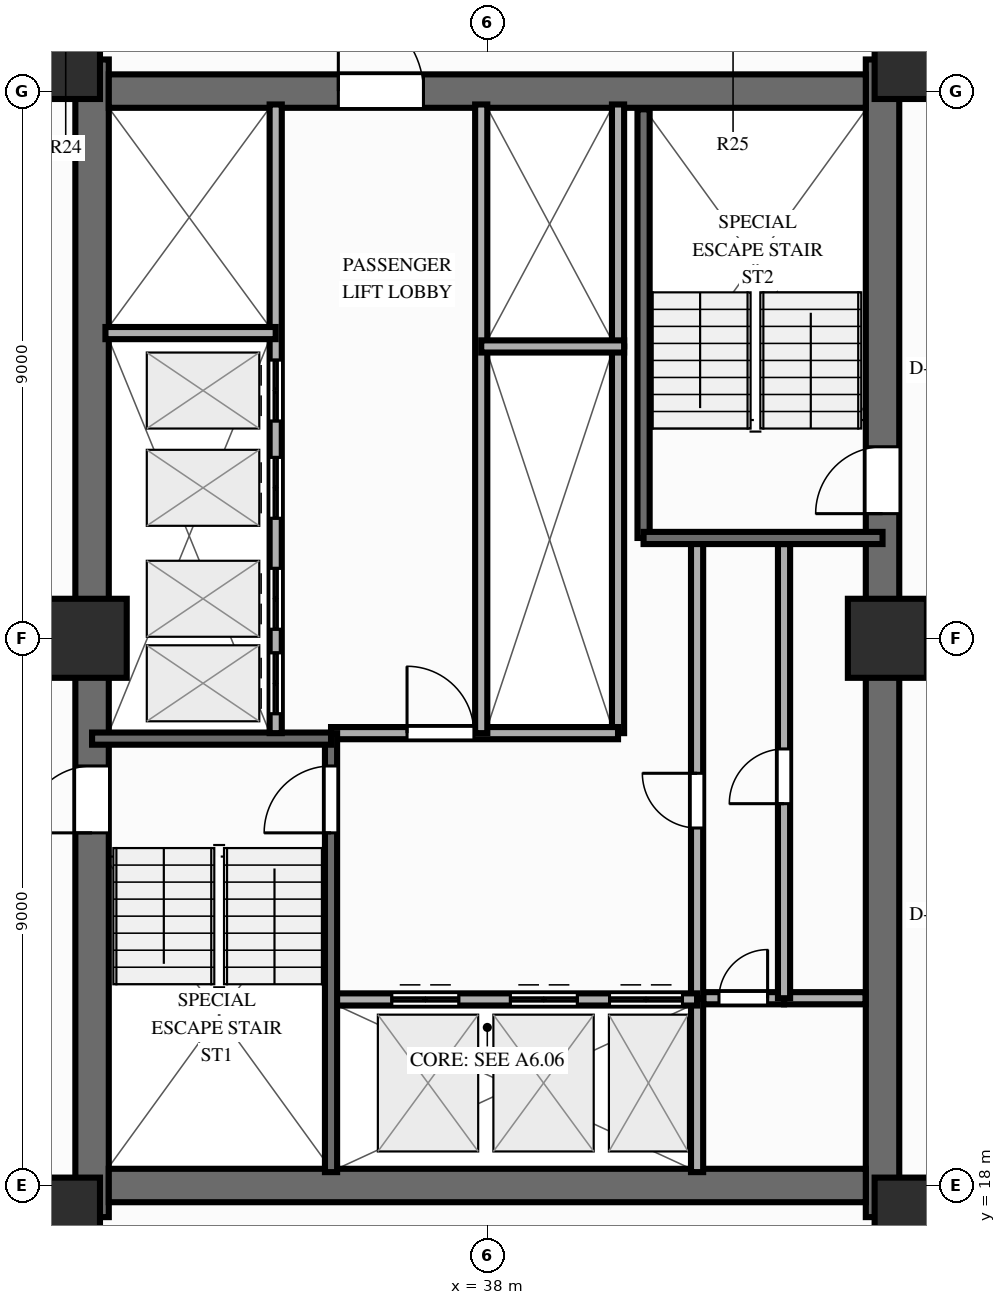
"""IFC4 building model, lengths in metres.
Left out: names, types, materials, properties, quantities, classifications, styles, units other than length and angle.
Written with IfcOpenShell. Run it as: python <this file> out.ifc"""

import sys

from ifc_helpers import new_model, si_unit, direction, frame, frame_2d, origin, origin_2d, place, context, subcontext, project, spatial, rectangle, extrude, source, transform, mapped, element, fill, save


model = new_model("IFC4")
c1 = context("Model", 3, precision=1e-05, world=origin(), true_north=direction((0.0, 1.0)))
c2 = subcontext(c1, "Body", "Model", "MODEL_VIEW")
j1 = project(units=[si_unit("LENGTHUNIT", "METRE"), si_unit("PLANEANGLEUNIT", "RADIAN")], contexts=[c1])
p1 = place(None, origin())
s1 = spatial("IfcSite", under=j1, at=p1, CompositionType="ELEMENT")
p2 = place(p1, origin())
s2 = spatial("IfcBuilding", under=s1, at=p2, CompositionType="ELEMENT")
p3 = place(p2, frame((0.0, 0.0, 86.85)))
s3 = spatial("IfcBuildingStorey", under=s2, at=p3, CompositionType="ELEMENT", Elevation=86.85)
p4 = place(p3, frame((31.5, 17.48, 0.0), z_axis=(0.0, 0.0, 1.0), x_axis=(0.0, 1.0, 0.0)))
e1 = element("IfcWall", 1, at=p4, inside=s3, PredefinedType="SHEAR", context=c2, shape_type="SweptSolid", body=[
    extrude(rectangle(XDim=19.04, YDim=0.55, at=frame_2d((9.52, 0.0))), origin(), (0.0, 0.0, 1.0), 3.0),
])
p5 = place(p4, frame((6.32, 0.0, 0.0)))
e2 = element("IfcOpeningElement", 2, at=p5, cuts=e1, PredefinedType="OPENING", context=c2, shape_type="SweptSolid", body=[
    extrude(rectangle(XDim=1.1, YDim=2.15, at=frame_2d((0.55, 1.075))), frame((0.0, 0.287, 0.0), z_axis=(0.0, -1.0, 0.0), x_axis=(1.0, 0.0, 0.0)), (0.0, 0.0, 1.0), 0.574),
])
p6 = place(p3, frame((44.5, 17.48, 0.0), z_axis=(0.0, 0.0, 1.0), x_axis=(0.0, 1.0, 0.0)))
e3 = element("IfcWall", 3, at=p6, inside=s3, PredefinedType="SHEAR", context=c2, shape_type="SweptSolid", body=[
    extrude(rectangle(XDim=19.04, YDim=0.55, at=frame_2d((9.52, 0.0))), origin(), (0.0, 0.0, 1.0), 3.0),
])
p7 = place(p6, frame((12.67, 0.0, 0.0), z_axis=(0.0, 0.0, 1.0), x_axis=(-1.0, 0.0, 0.0)))
e4 = element("IfcOpeningElement", 4, at=p7, cuts=e3, PredefinedType="OPENING", context=c2, shape_type="SweptSolid", body=[
    extrude(rectangle(XDim=1.1, YDim=2.15, at=frame_2d((0.55, 1.075))), frame((0.0, 0.287, 0.0), z_axis=(0.0, -1.0, 0.0), x_axis=(1.0, 0.0, 0.0)), (0.0, 0.0, 1.0), 0.574),
])
p8 = place(p3, frame((31.775, 18.0, 0.0), z_axis=(0.0, 0.0, 1.0), x_axis=(1.0, 0.0, 0.0)))
e5 = element("IfcWall", 5, at=p8, inside=s3, PredefinedType="SHEAR", context=c2, shape_type="SweptSolid", body=[
    extrude(rectangle(XDim=12.45, YDim=0.55, at=frame_2d((6.225, 0.0))), origin(), (0.0, 0.0, 1.0), 3.0),
])
p9 = place(p3, frame((31.775, 36.0, 0.0), z_axis=(0.0, 0.0, 1.0), x_axis=(1.0, 0.0, 0.0)))
e6 = element("IfcWall", 6, at=p9, inside=s3, PredefinedType="SHEAR", context=c2, shape_type="SweptSolid", body=[
    extrude(rectangle(XDim=12.45, YDim=0.55, at=frame_2d((6.225, 0.0))), origin(), (0.0, 0.0, 1.0), 3.0),
])
p10 = place(p9, frame((5.175, 0.0, 0.0), z_axis=(0.0, 0.0, 1.0), x_axis=(-1.0, 0.0, 0.0)))
e7 = element("IfcOpeningElement", 7, at=p10, cuts=e6, PredefinedType="OPENING", context=c2, shape_type="SweptSolid", body=[
    extrude(rectangle(XDim=1.4, YDim=2.15, at=frame_2d((0.7, 1.075))), frame((0.0, 0.287, 0.0), z_axis=(0.0, -1.0, 0.0), x_axis=(1.0, 0.0, 0.0)), (0.0, 0.0, 1.0), 0.574),
])
m1 = source(origin(), c2, "Body", "SweptSolid", [
    extrude(rectangle(XDim=1.3, YDim=1.3, at=origin_2d()), origin(), (0.0, 0.0, 1.0), 3.0),
])
for number, where, z_axis, x_axis in (
    (8, (30.98, 17.48, 0.0), (0.0, 0.0, 1.0), (1.0, 0.0, 0.0)),
    (9, (45.02, 17.48, 0.0), (0.0, 0.0, 1.0), (1.0, 0.0, 0.0)),
    (10, (30.98, 36.52, 0.0), (0.0, 0.0, 1.0), (1.0, 0.0, 0.0)),
    (11, (45.02, 36.52, 0.0), (0.0, 0.0, 1.0), (1.0, 0.0, 0.0)),
    (12, (31.42, 27.0, 0.0), (0.0, 0.0, 1.0), (1.0, 0.0, 0.0)),
    (13, (44.58, 27.0, 0.0), (0.0, 0.0, 1.0), (1.0, 0.0, 0.0)),
):
    element("IfcColumn", number, at=place(p3, frame(where, z_axis=z_axis, x_axis=x_axis)), inside=s3, PredefinedType="COLUMN", context=c2, shape_type="MappedRepresentation", body=[
        mapped(m1, transform((0.0, 0.0, 0.0), scale=1.0)),
    ])
p11 = place(p3, frame((41.55, 21.08, 0.0), z_axis=(0.0, 0.0, 1.0), x_axis=(1.0, 0.0, 0.0)))
e14 = element("IfcWall", 14, at=p11, inside=s3, PredefinedType="PARTITIONING", context=c2, shape_type="SweptSolid", body=[
    extrude(rectangle(XDim=1.33, YDim=0.2, at=frame_2d((0.665, 0.0))), origin(), (0.0, 0.0, 1.0), 2.79),
])
p12 = place(p11, frame((0.26, 0.0, 0.0)))
e15 = element("IfcOpeningElement", 15, at=p12, cuts=e14, PredefinedType="OPENING", context=c2, shape_type="SweptSolid", body=[
    extrude(rectangle(XDim=0.8, YDim=2.05, at=frame_2d((0.4, 1.025))), frame((0.0, 0.112, 0.0), z_axis=(0.0, -1.0, 0.0), x_axis=(1.0, 0.0, 0.0)), (0.0, 0.0, 1.0), 0.224),
])
p13 = place(p3, frame((42.88, 21.08, 0.0), z_axis=(0.0, 0.0, 1.0), x_axis=(1.0, 0.0, 0.0)))
e16 = element("IfcWall", 16, at=p13, inside=s3, PredefinedType="PARTITIONING", context=c2, shape_type="SweptSolid", body=[
    extrude(rectangle(XDim=1.34, YDim=0.2, at=frame_2d((0.67, 0.0))), origin(), (0.0, 0.0, 1.0), 2.79),
])
p14 = place(p3, frame((42.88, 21.08, 0.0), z_axis=(0.0, 0.0, 1.0), x_axis=(0.0, 1.0, 0.0)))
e17 = element("IfcWall", 17, at=p14, inside=s3, PredefinedType="PARTITIONING", context=c2, shape_type="SweptSolid", body=[
    extrude(rectangle(XDim=7.47, YDim=0.2, at=frame_2d((3.735, 0.0))), origin(), (0.0, 0.0, 1.0), 2.79),
])
p15 = place(p14, frame((3.2, 0.0, 0.0)))
e18 = element("IfcOpeningElement", 18, at=p15, cuts=e17, PredefinedType="OPENING", context=c2, shape_type="SweptSolid", body=[
    extrude(rectangle(XDim=0.9, YDim=2.1, at=frame_2d((0.45, 1.05))), frame((0.0, 0.112, 0.0), z_axis=(0.0, -1.0, 0.0), x_axis=(1.0, 0.0, 0.0)), (0.0, 0.0, 1.0), 0.224),
])
p16 = place(p3, frame((41.45, 18.22, 0.0), z_axis=(0.0, 0.0, 1.0), x_axis=(0.0, 1.0, 0.0)))
e19 = element("IfcWall", 19, at=p16, inside=s3, PredefinedType="PARTITIONING", context=c2, shape_type="SweptSolid", body=[
    extrude(rectangle(XDim=2.86, YDim=0.2, at=frame_2d((1.43, 0.0))), origin(), (0.0, 0.0, 1.0), 2.79),
])
p17 = place(p3, frame((41.45, 21.08, 0.0), z_axis=(0.0, 0.0, 1.0), x_axis=(0.0, 1.0, 0.0)))
e20 = element("IfcWall", 20, at=p17, inside=s3, PredefinedType="PARTITIONING", context=c2, shape_type="SweptSolid", body=[
    extrude(rectangle(XDim=7.52, YDim=0.2, at=frame_2d((3.76, 0.0))), origin(), (0.0, 0.0, 1.0), 2.79),
])
p18 = place(p17, frame((2.8, 0.0, 0.0)))
e21 = element("IfcOpeningElement", 21, at=p18, cuts=e20, PredefinedType="OPENING", context=c2, shape_type="SweptSolid", body=[
    extrude(rectangle(XDim=0.9, YDim=2.1, at=frame_2d((0.45, 1.05))), frame((0.0, 0.112, 0.0), z_axis=(0.0, -1.0, 0.0), x_axis=(1.0, 0.0, 0.0)), (0.0, 0.0, 1.0), 0.224),
])
p19 = place(p3, frame((40.15, 25.44, 0.0), z_axis=(0.0, 0.0, 1.0), x_axis=(0.0, 1.0, 0.0)))
e22 = element("IfcWall", 22, at=p19, inside=s3, PredefinedType="PARTITIONING", context=c2, shape_type="SweptSolid", body=[
    extrude(rectangle(XDim=6.36, YDim=0.2, at=frame_2d((3.18, 0.0))), origin(), (0.0, 0.0, 1.0), 2.79),
])
p20 = place(p3, frame((40.15, 31.8, 0.0), z_axis=(0.0, 0.0, 1.0), x_axis=(0.0, 1.0, 0.0)))
e23 = element("IfcWall", 23, at=p20, inside=s3, PredefinedType="PARTITIONING", context=c2, shape_type="SweptSolid", body=[
    extrude(rectangle(XDim=3.98, YDim=0.2, at=frame_2d((1.99, 0.0))), origin(), (0.0, 0.0, 1.0), 2.79),
])
p21 = place(p3, frame((35.43, 21.06, 0.0), z_axis=(0.0, 0.0, 1.0), x_axis=(1.0, 0.0, 0.0)))
e24 = element("IfcWall", 24, at=p21, inside=s3, PredefinedType="PARTITIONING", context=c2, shape_type="SweptSolid", body=[
    extrude(rectangle(XDim=6.02, YDim=0.2, at=frame_2d((3.01, 0.0))), origin(), (0.0, 0.0, 1.0), 2.79),
])
p22 = place(p21, frame((1.0, 0.0, 0.0)))
e25 = element("IfcOpeningElement", 25, at=p22, cuts=e24, PredefinedType="OPENING", context=c2, shape_type="SweptSolid", body=[
    extrude(rectangle(XDim=1.1, YDim=2.15, at=frame_2d((0.55, 1.075))), frame((0.0, 0.112, 0.0), z_axis=(0.0, -1.0, 0.0), x_axis=(1.0, 0.0, 0.0)), (0.0, 0.0, 1.0), 0.224),
])
p23 = place(p21, frame((2.95, 0.0, 0.0)))
e26 = element("IfcOpeningElement", 26, at=p23, cuts=e24, PredefinedType="OPENING", context=c2, shape_type="SweptSolid", body=[
    extrude(rectangle(XDim=1.1, YDim=2.15, at=frame_2d((0.55, 1.075))), frame((0.0, 0.112, 0.0), z_axis=(0.0, -1.0, 0.0), x_axis=(1.0, 0.0, 0.0)), (0.0, 0.0, 1.0), 0.224),
])
p24 = place(p21, frame((4.58, 0.0, 0.0)))
e27 = element("IfcOpeningElement", 27, at=p24, cuts=e24, PredefinedType="OPENING", context=c2, shape_type="SweptSolid", body=[
    extrude(rectangle(XDim=1.2, YDim=2.15, at=frame_2d((0.6, 1.075))), frame((0.0, 0.112, 0.0), z_axis=(0.0, -1.0, 0.0), x_axis=(1.0, 0.0, 0.0)), (0.0, 0.0, 1.0), 0.224),
])
p25 = place(p3, frame((35.43, 25.44, 0.0), z_axis=(0.0, 0.0, 1.0), x_axis=(1.0, 0.0, 0.0)))
e28 = element("IfcWall", 28, at=p25, inside=s3, PredefinedType="PARTITIONING", context=c2, shape_type="SweptSolid", body=[
    extrude(rectangle(XDim=4.72, YDim=0.2, at=frame_2d((2.36, 0.0))), origin(), (0.0, 0.0, 1.0), 2.79),
])
p26 = place(p25, frame((1.25, 0.0, 0.0)))
e29 = element("IfcOpeningElement", 29, at=p26, cuts=e28, PredefinedType="OPENING", context=c2, shape_type="SweptSolid", body=[
    extrude(rectangle(XDim=1.1, YDim=2.15, at=frame_2d((0.55, 1.075))), frame((0.0, 0.112, 0.0), z_axis=(0.0, -1.0, 0.0), x_axis=(1.0, 0.0, 0.0)), (0.0, 0.0, 1.0), 0.224),
])
p27 = place(p3, frame((35.43, 18.22, 0.0), z_axis=(0.0, 0.0, 1.0), x_axis=(0.0, 1.0, 0.0)))
e30 = element("IfcWall", 30, at=p27, inside=s3, PredefinedType="SOLIDWALL", context=c2, shape_type="SweptSolid", body=[
    extrude(rectangle(XDim=7.22, YDim=0.2, at=frame_2d((3.61, 0.0))), origin(), (0.0, 0.0, 1.0), 2.79),
])
p28 = place(p27, frame((6.68, 0.0, 0.0), z_axis=(0.0, 0.0, 1.0), x_axis=(-1.0, 0.0, 0.0)))
e31 = element("IfcOpeningElement", 31, at=p28, cuts=e30, PredefinedType="OPENING", context=c2, shape_type="SweptSolid", body=[
    extrude(rectangle(XDim=1.1, YDim=2.15, at=frame_2d((0.55, 1.075))), frame((0.0, 0.112, 0.0), z_axis=(0.0, -1.0, 0.0), x_axis=(1.0, 0.0, 0.0)), (0.0, 0.0, 1.0), 0.224),
])
p29 = place(p3, frame((31.5, 25.35, 0.0), z_axis=(0.0, 0.0, 1.0), x_axis=(1.0, 0.0, 0.0)))
e32 = element("IfcWall", 32, at=p29, inside=s3, PredefinedType="SOLIDWALL", context=c2, shape_type="SweptSolid", body=[
    extrude(rectangle(XDim=3.93, YDim=0.2, at=frame_2d((1.965, 0.0))), origin(), (0.0, 0.0, 1.0), 2.79),
])
p30 = place(p3, frame((40.57, 28.65, 0.0), z_axis=(0.0, 0.0, 1.0), x_axis=(0.0, 1.0, 0.0)))
e33 = element("IfcWall", 33, at=p30, inside=s3, PredefinedType="SOLIDWALL", context=c2, shape_type="SweptSolid", body=[
    extrude(rectangle(XDim=7.05, YDim=0.2, at=frame_2d((3.525, 0.0))), origin(), (0.0, 0.0, 1.0), 2.79),
])
p31 = place(p3, frame((40.57, 28.65, 0.0), z_axis=(0.0, 0.0, 1.0), x_axis=(1.0, 0.0, 0.0)))
e34 = element("IfcWall", 34, at=p31, inside=s3, PredefinedType="SOLIDWALL", context=c2, shape_type="SweptSolid", body=[
    extrude(rectangle(XDim=3.93, YDim=0.2, at=frame_2d((1.965, 0.0))), origin(), (0.0, 0.0, 1.0), 2.79),
])
p32 = place(p3, frame((34.52, 25.44, 0.0), z_axis=(0.0, 0.0, 1.0), x_axis=(0.0, 1.0, 0.0)))
e35 = element("IfcWall", 35, at=p32, inside=s3, PredefinedType="PARTITIONING", context=c2, shape_type="SweptSolid", body=[
    extrude(rectangle(XDim=10.34, YDim=0.2, at=frame_2d((5.17, 0.0))), origin(), (0.0, 0.0, 1.0), 2.79),
])
p33 = place(p32, frame((0.32, 0.0, 0.0)))
e36 = element("IfcOpeningElement", 36, at=p33, cuts=e35, PredefinedType="OPENING", context=c2, shape_type="SweptSolid", body=[
    extrude(rectangle(XDim=1.0, YDim=2.15, at=frame_2d((0.5, 1.075))), frame((0.0, 0.112, 0.0), z_axis=(0.0, -1.0, 0.0), x_axis=(1.0, 0.0, 0.0)), (0.0, 0.0, 1.0), 0.224),
])
p34 = place(p32, frame((1.71, 0.0, 0.0)))
e37 = element("IfcOpeningElement", 37, at=p34, cuts=e35, PredefinedType="OPENING", context=c2, shape_type="SweptSolid", body=[
    extrude(rectangle(XDim=1.0, YDim=2.15, at=frame_2d((0.5, 1.075))), frame((0.0, 0.112, 0.0), z_axis=(0.0, -1.0, 0.0), x_axis=(1.0, 0.0, 0.0)), (0.0, 0.0, 1.0), 0.224),
])
p35 = place(p32, frame((3.535, 0.0, 0.0)))
e38 = element("IfcOpeningElement", 38, at=p35, cuts=e35, PredefinedType="OPENING", context=c2, shape_type="SweptSolid", body=[
    extrude(rectangle(XDim=1.0, YDim=2.15, at=frame_2d((0.5, 1.075))), frame((0.0, 0.112, 0.0), z_axis=(0.0, -1.0, 0.0), x_axis=(1.0, 0.0, 0.0)), (0.0, 0.0, 1.0), 0.224),
])
p36 = place(p32, frame((5.135, 0.0, 0.0)))
e39 = element("IfcOpeningElement", 39, at=p36, cuts=e35, PredefinedType="OPENING", context=c2, shape_type="SweptSolid", body=[
    extrude(rectangle(XDim=1.0, YDim=2.15, at=frame_2d((0.5, 1.075))), frame((0.0, 0.112, 0.0), z_axis=(0.0, -1.0, 0.0), x_axis=(1.0, 0.0, 0.0)), (0.0, 0.0, 1.0), 0.224),
])
p37 = place(p3, frame((31.72, 32.02, 0.0), z_axis=(0.0, 0.0, 1.0), x_axis=(1.0, 0.0, 0.0)))
e40 = element("IfcWall", 40, at=p37, inside=s3, PredefinedType="PARTITIONING", context=c2, shape_type="SweptSolid", body=[
    extrude(rectangle(XDim=2.8, YDim=0.2, at=frame_2d((1.4, 0.0))), origin(), (0.0, 0.0, 1.0), 2.79),
])
p38 = place(p3, frame((37.9, 25.44, 0.0), z_axis=(0.0, 0.0, 1.0), x_axis=(0.0, 1.0, 0.0)))
e41 = element("IfcWall", 41, at=p38, inside=s3, PredefinedType="PARTITIONING", context=c2, shape_type="SweptSolid", body=[
    extrude(rectangle(XDim=10.34, YDim=0.2, at=frame_2d((5.17, 0.0))), origin(), (0.0, 0.0, 1.0), 2.79),
])
p39 = place(p3, frame((37.9, 31.8, 0.0), z_axis=(0.0, 0.0, 1.0), x_axis=(1.0, 0.0, 0.0)))
e42 = element("IfcWall", 42, at=p39, inside=s3, PredefinedType="PARTITIONING", context=c2, shape_type="SweptSolid", body=[
    extrude(rectangle(XDim=2.35, YDim=0.2, at=frame_2d((1.175, 0.0))), origin(), (0.0, 0.0, 1.0), 2.79),
])
m2 = source(origin(), c2, "Body", "SweptSolid", [
    extrude(rectangle(XDim=1.1, YDim=2.15, at=frame_2d((0.55, 1.075))), frame((0.0, 0.025, 0.0), z_axis=(0.0, -1.0, 0.0), x_axis=(1.0, 0.0, 0.0)), (0.0, 0.0, 1.0), 0.05),
])
p40 = place(p5, origin())
e43 = element("IfcDoor", 43, at=p40, inside=s3, OperationType="SINGLE_SWING_LEFT", PredefinedType="DOOR", context=c2, shape_type="MappedRepresentation", body=[
    mapped(m2, transform((0.0, 0.0, 0.0), scale=1.0)),
])
fill(e2, e43)
p41 = place(p7, origin())
e44 = element("IfcDoor", 44, at=p41, inside=s3, OperationType="SINGLE_SWING_RIGHT", PredefinedType="DOOR", context=c2, shape_type="MappedRepresentation", body=[
    mapped(m2, transform((0.0, 0.0, 0.0), scale=1.0)),
])
fill(e4, e44)
m3 = source(origin(), c2, "Body", "SweptSolid", [
    extrude(rectangle(XDim=1.4, YDim=2.15, at=frame_2d((0.7, 1.075))), frame((0.0, 0.025, 0.0), z_axis=(0.0, -1.0, 0.0), x_axis=(1.0, 0.0, 0.0)), (0.0, 0.0, 1.0), 0.05),
])
p42 = place(p10, origin())
e45 = element("IfcDoor", 45, at=p42, inside=s3, OperationType="SINGLE_SWING_RIGHT", PredefinedType="DOOR", context=c2, shape_type="MappedRepresentation", body=[
    mapped(m3, transform((0.0, 0.0, 0.0), scale=1.0)),
])
fill(e7, e45)
m4 = source(origin(), c2, "Body", "SweptSolid", [
    extrude(rectangle(XDim=0.8, YDim=2.05, at=frame_2d((0.4, 1.025))), frame((0.0, 0.025, 0.0), z_axis=(0.0, -1.0, 0.0), x_axis=(1.0, 0.0, 0.0)), (0.0, 0.0, 1.0), 0.05),
])
p43 = place(p12, origin())
e46 = element("IfcDoor", 46, at=p43, inside=s3, OperationType="SINGLE_SWING_RIGHT", PredefinedType="DOOR", context=c2, shape_type="MappedRepresentation", body=[
    mapped(m4, transform((0.0, 0.0, 0.0), scale=1.0)),
])
fill(e15, e46)
m5 = source(origin(), c2, "Body", "SweptSolid", [
    extrude(rectangle(XDim=0.9, YDim=2.1, at=frame_2d((0.45, 1.05))), frame((0.0, 0.025, 0.0), z_axis=(0.0, -1.0, 0.0), x_axis=(1.0, 0.0, 0.0)), (0.0, 0.0, 1.0), 0.05),
])
p44 = place(p15, origin())
e47 = element("IfcDoor", 47, at=p44, inside=s3, OperationType="SINGLE_SWING_LEFT", PredefinedType="DOOR", context=c2, shape_type="MappedRepresentation", body=[
    mapped(m5, transform((0.0, 0.0, 0.0), scale=1.0)),
])
fill(e18, e47)
p45 = place(p18, origin())
e48 = element("IfcDoor", 48, at=p45, inside=s3, OperationType="SINGLE_SWING_RIGHT", PredefinedType="DOOR", context=c2, shape_type="MappedRepresentation", body=[
    mapped(m5, transform((0.0, 0.0, 0.0), scale=1.0)),
])
fill(e21, e48)
p46 = place(p22, origin())
e49 = element("IfcDoor", 49, at=p46, inside=s3, OperationType="DOUBLE_DOOR_SLIDING", PredefinedType="DOOR", context=c2, shape_type="MappedRepresentation", body=[
    mapped(m2, transform((0.0, 0.0, 0.0), scale=1.0)),
])
fill(e25, e49)
p47 = place(p23, origin())
e50 = element("IfcDoor", 50, at=p47, inside=s3, OperationType="DOUBLE_DOOR_SLIDING", PredefinedType="DOOR", context=c2, shape_type="MappedRepresentation", body=[
    mapped(m2, transform((0.0, 0.0, 0.0), scale=1.0)),
])
fill(e26, e50)
m6 = source(origin(), c2, "Body", "SweptSolid", [
    extrude(rectangle(XDim=1.2, YDim=2.15, at=frame_2d((0.6, 1.075))), frame((0.0, 0.025, 0.0), z_axis=(0.0, -1.0, 0.0), x_axis=(1.0, 0.0, 0.0)), (0.0, 0.0, 1.0), 0.05),
])
p48 = place(p24, origin())
e51 = element("IfcDoor", 51, at=p48, inside=s3, OperationType="DOUBLE_DOOR_SLIDING", PredefinedType="DOOR", context=c2, shape_type="MappedRepresentation", body=[
    mapped(m6, transform((0.0, 0.0, 0.0), scale=1.0)),
])
fill(e27, e51)
p49 = place(p26, origin())
e52 = element("IfcDoor", 52, at=p49, inside=s3, OperationType="SINGLE_SWING_LEFT", PredefinedType="DOOR", context=c2, shape_type="MappedRepresentation", body=[
    mapped(m2, transform((0.0, 0.0, 0.0), scale=1.0)),
])
fill(e29, e52)
p50 = place(p28, origin())
e53 = element("IfcDoor", 53, at=p50, inside=s3, OperationType="SINGLE_SWING_RIGHT", PredefinedType="DOOR", context=c2, shape_type="MappedRepresentation", body=[
    mapped(m2, transform((0.0, 0.0, 0.0), scale=1.0)),
])
fill(e31, e53)
m7 = source(origin(), c2, "Body", "SweptSolid", [
    extrude(rectangle(XDim=1.0, YDim=2.15, at=frame_2d((0.5, 1.075))), frame((0.0, 0.025, 0.0), z_axis=(0.0, -1.0, 0.0), x_axis=(1.0, 0.0, 0.0)), (0.0, 0.0, 1.0), 0.05),
])
p51 = place(p33, origin())
e54 = element("IfcDoor", 54, at=p51, inside=s3, OperationType="DOUBLE_DOOR_SLIDING", PredefinedType="DOOR", context=c2, shape_type="MappedRepresentation", body=[
    mapped(m7, transform((0.0, 0.0, 0.0), scale=1.0)),
])
fill(e36, e54)
p52 = place(p34, origin())
e55 = element("IfcDoor", 55, at=p52, inside=s3, OperationType="DOUBLE_DOOR_SLIDING", PredefinedType="DOOR", context=c2, shape_type="MappedRepresentation", body=[
    mapped(m7, transform((0.0, 0.0, 0.0), scale=1.0)),
])
fill(e37, e55)
p53 = place(p35, origin())
e56 = element("IfcDoor", 56, at=p53, inside=s3, OperationType="DOUBLE_DOOR_SLIDING", PredefinedType="DOOR", context=c2, shape_type="MappedRepresentation", body=[
    mapped(m7, transform((0.0, 0.0, 0.0), scale=1.0)),
])
fill(e38, e56)
p54 = place(p36, origin())
e57 = element("IfcDoor", 57, at=p54, inside=s3, OperationType="DOUBLE_DOOR_SLIDING", PredefinedType="DOOR", context=c2, shape_type="MappedRepresentation", body=[
    mapped(m7, transform((0.0, 0.0, 0.0), scale=1.0)),
])
fill(e39, e57)
save(model, sys.argv[1])
